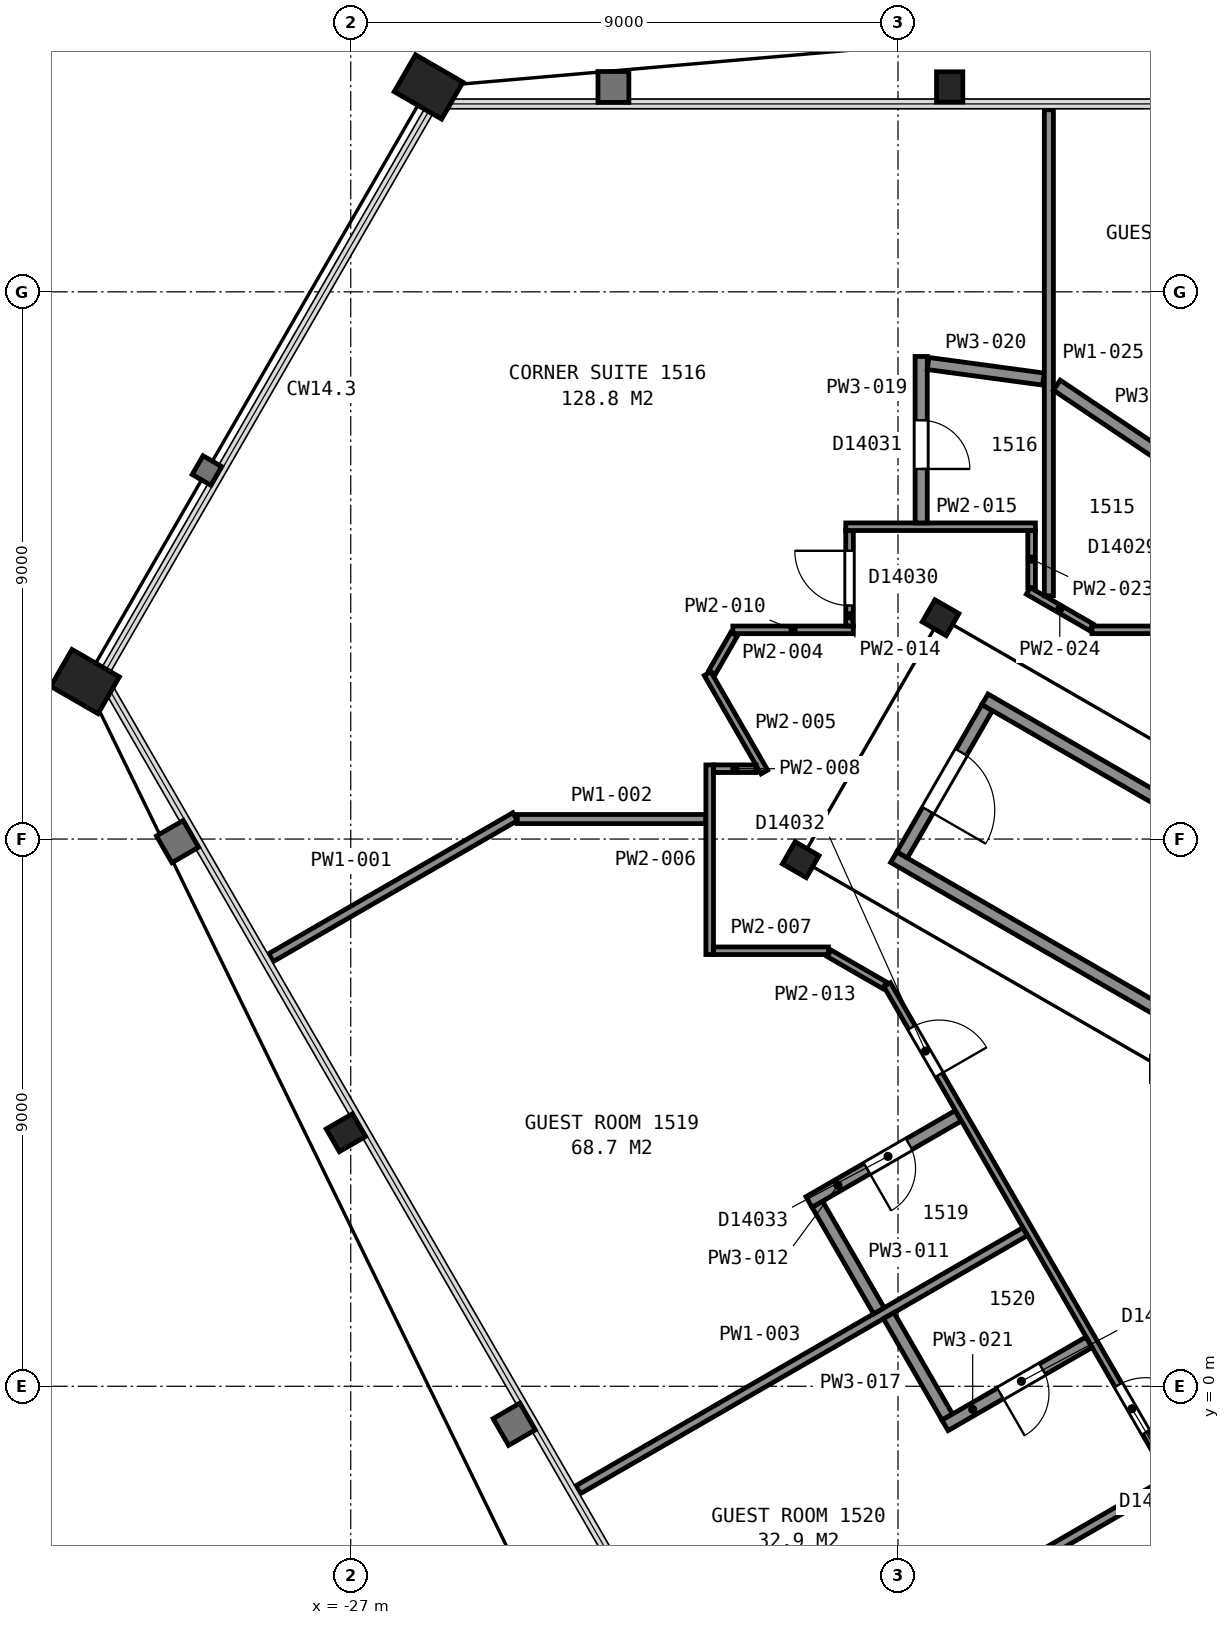
"""IFC4 building model, lengths in metres.
Left out: names, types, materials, properties, quantities, classifications, styles, units other than length and angle.
Written with IfcOpenShell. Run it as: python <this file> out.ifc"""

import sys

from ifc_helpers import new_model, si_unit, direction, frame, frame_2d, origin, origin_2d, place, context, subcontext, project, spatial, rectangle, hollow_rectangle, i_section, extrude, element, fill, save


model = new_model("IFC4")
c1 = context("Model", 3, precision=1e-05, world=origin(), true_north=direction((0.0, 1.0)))
c2 = subcontext(c1, "Body", "Model", "MODEL_VIEW")
j1 = project(units=[si_unit("LENGTHUNIT", "METRE"), si_unit("PLANEANGLEUNIT", "RADIAN")], contexts=[c1])
p1 = place(None, origin())
s1 = spatial("IfcSite", under=j1, at=p1, CompositionType="ELEMENT")
p2 = place(p1, origin())
s2 = spatial("IfcBuilding", under=s1, at=p2, CompositionType="ELEMENT")
p3 = place(p2, frame((0.0, 0.0, 69.2)))
s3 = spatial("IfcBuildingStorey", under=s2, at=p3, CompositionType="ELEMENT", Elevation=69.2)
p4 = place(p3, frame((-17.15, 21.37, 0.0), z_axis=(0.0, 0.0, 1.0), x_axis=(1.0, 0.0, 0.0)))
e1 = element("IfcColumn", 1, at=p4, inside=s3, PredefinedType="COLUMN", context=c2, shape_type="SweptSolid", body=[
    extrude(i_section(OverallWidth=0.432, OverallDepth=0.498, WebThickness=0.056, FlangeThickness=0.089, FilletRadius=0.015, at=origin_2d()), origin(), (0.0, 0.0, 1.0), 3.575),
])
for number, where, z_axis, x_axis in (
    (2, (-25.72, 21.37, 0.0), (0.0, 0.0, 1.0), (0.5, 0.866, 0.0)),
    (3, (-31.37, 11.59, 0.0), (0.0, 0.0, 1.0), (0.5, 0.866, 0.0)),
):
    element("IfcColumn", number, at=place(p3, frame(where, z_axis=z_axis, x_axis=x_axis)), inside=s3, PredefinedType="COLUMN", context=c2, shape_type="SweptSolid", body=[
        extrude(hollow_rectangle(XDim=0.7, YDim=0.9, WallThickness=0.065, at=origin_2d()), origin(), (0.0, 0.0, 1.0), 3.56),
    ])
p5 = place(p3, frame((-27.08, 4.17, 0.0), z_axis=(0.0, 0.0, 1.0), x_axis=(-0.5, 0.866025403784, 0.0)))
e4 = element("IfcColumn", 4, at=p5, inside=s3, PredefinedType="COLUMN", context=c2, shape_type="SweptSolid", body=[
    extrude(i_section(OverallWidth=0.432, OverallDepth=0.498, WebThickness=0.056, FlangeThickness=0.089, FilletRadius=0.015, at=origin_2d()), origin(), (0.0, 0.0, 1.0), 3.575),
])
for number, where, z_axis, x_axis in (
    (5, (-17.3, 12.64, 0.0), (0.0, 0.0, 1.0), (0.5, 0.866, 0.0)),
    (6, (-19.6, 8.66, 0.0), (0.0, 0.0, 1.0), (0.5, 0.866, 0.0)),
):
    element("IfcColumn", number, at=place(p3, frame(where, z_axis=z_axis, x_axis=x_axis)), inside=s3, PredefinedType="COLUMN", context=c2, shape_type="SweptSolid", body=[
        extrude(i_section(OverallWidth=0.419, OverallDepth=0.455, WebThickness=0.042, FlangeThickness=0.068, FilletRadius=0.015, at=origin_2d()), origin(), (0.0, 0.0, 1.0), 3.6),
    ])
p6 = place(p3, frame((-16.534, 11.162, 0.0), z_axis=(0.0, 0.0, 1.0), x_axis=(-0.49998411664, -0.866034573852, 0.0)))
e7 = element("IfcWall", 7, at=p6, inside=s3, PredefinedType="PARTITIONING", context=c2, shape_type="SweptSolid", body=[
    extrude(rectangle(XDim=2.8, YDim=0.2, at=frame_2d((1.4, 0.0))), origin(), (0.0, 0.0, 1.0), 3.35),
])
p7 = place(p6, frame((0.85, 0.0, 0.0)))
e8 = element("IfcOpeningElement", 8, at=p7, cuts=e7, PredefinedType="OPENING", context=c2, shape_type="SweptSolid", body=[
    extrude(rectangle(XDim=1.1, YDim=2.1, at=frame_2d((0.55, 1.05))), frame((0.0, 0.11, 0.0), z_axis=(0.0, -1.0, 0.0), x_axis=(1.0, 0.0, 0.0)), (0.0, 0.0, 1.0), 0.22),
])
for number, where, z_axis, x_axis in (
    (9, (-7.678, 2.701, 0.0), (0.0, 0.0, 1.0), (-0.866, 0.5, 0.0)),
    (10, (-6.178, 5.299, 0.0), (0.0, 0.0, 1.0), (-0.866, 0.5, 0.0)),
):
    element("IfcWall", number, at=place(p3, frame(where, z_axis=z_axis, x_axis=x_axis)), inside=s3, PredefinedType="PARTITIONING", context=c2, shape_type="SweptSolid", body=[
        extrude(rectangle(XDim=12.0, YDim=0.2, at=frame_2d((6.0, 0.0))), origin(), (0.0, 0.0, 1.0), 3.35),
    ])
p8 = place(p3, frame((-28.313, 7.05, 0.0), z_axis=(0.0, 0.0, 1.0), x_axis=(0.866076865069, 0.499910855846, 0.0)))
e11 = element("IfcWall", 11, at=p8, inside=s3, PredefinedType="PARTITIONING", context=c2, shape_type="SweptSolid", body=[
    extrude(rectangle(XDim=4.636, YDim=0.15, at=frame_2d((2.318, 0.0))), origin(), (0.0, 0.0, 1.0), 2.613),
])
p9 = place(p3, frame((-24.262, 9.329, 0.0), z_axis=(0.0, 0.0, 1.0), x_axis=(1.0, 0.0, 0.0)))
e12 = element("IfcWall", 12, at=p9, inside=s3, PredefinedType="PARTITIONING", context=c2, shape_type="SweptSolid", body=[
    extrude(rectangle(XDim=3.103, YDim=0.15, at=frame_2d((1.551, 0.0))), origin(), (0.0, 0.0, 1.0), 2.613),
])
p10 = place(p3, frame((-23.26, -1.701, 0.0), z_axis=(0.0, 0.0, 1.0), x_axis=(0.866027021296, 0.499997198377, 0.0)))
e13 = element("IfcWall", 13, at=p10, inside=s3, PredefinedType="PARTITIONING", context=c2, shape_type="SweptSolid", body=[
    extrude(rectangle(XDim=8.487, YDim=0.15, at=frame_2d((4.243, 0.0))), origin(), (0.0, 0.0, 1.0), 2.613),
])
p11 = place(p3, frame((-21.059, 11.741, 0.0), z_axis=(0.0, 0.0, 1.0), x_axis=(0.500238258503, 0.865887801468, 0.0)))
e14 = element("IfcWall", 14, at=p11, inside=s3, PredefinedType="PARTITIONING", context=c2, shape_type="SweptSolid", body=[
    extrude(rectangle(XDim=0.724, YDim=0.125, at=frame_2d((0.362, 0.0))), origin(), (0.0, 0.0, 1.0), 2.613),
])
p12 = place(p3, frame((-21.132, 11.721, 0.0), z_axis=(0.0, 0.0, 1.0), x_axis=(0.500072997275, -0.865983254686, 0.0)))
e15 = element("IfcWall", 15, at=p12, inside=s3, PredefinedType="PARTITIONING", context=c2, shape_type="SweptSolid", body=[
    extrude(rectangle(XDim=1.869, YDim=0.125, at=frame_2d((0.935, 0.0))), origin(), (0.0, 0.0, 1.0), 2.613),
])
p13 = place(p3, frame((-21.097, 7.101, 0.0), z_axis=(0.0, 0.0, 1.0), x_axis=(0.0, 1.0, 0.0)))
e16 = element("IfcWall", 16, at=p13, inside=s3, PredefinedType="PARTITIONING", context=c2, shape_type="SweptSolid", body=[
    extrude(rectangle(XDim=3.119, YDim=0.125, at=frame_2d((1.56, 0.0))), origin(), (0.0, 0.0, 1.0), 2.613),
])
p14 = place(p3, frame((-21.032, 7.163, 0.0), z_axis=(0.0, 0.0, 1.0), x_axis=(1.0, 0.0, 0.0)))
e17 = element("IfcWall", 17, at=p14, inside=s3, PredefinedType="PARTITIONING", context=c2, shape_type="SweptSolid", body=[
    extrude(rectangle(XDim=1.888, YDim=0.125, at=frame_2d((0.944, 0.0))), origin(), (0.0, 0.0, 1.0), 2.613),
])
p15 = place(p3, frame((-21.032, 10.157, 0.0), z_axis=(0.0, 0.0, 1.0), x_axis=(1.0, 0.0, 0.0)))
e18 = element("IfcWall", 18, at=p15, inside=s3, PredefinedType="PARTITIONING", context=c2, shape_type="SweptSolid", body=[
    extrude(rectangle(XDim=0.698, YDim=0.125, at=frame_2d((0.349, 0.0))), origin(), (0.0, 0.0, 1.0), 2.613),
])
p16 = place(p3, frame((-20.889, -5.809, 0.0), z_axis=(0.0, 0.0, 1.0), x_axis=(0.866022790583, 0.50000452617, 0.0)))
e19 = element("IfcWall", 19, at=p16, inside=s3, PredefinedType="PARTITIONING", context=c2, shape_type="SweptSolid", body=[
    extrude(rectangle(XDim=8.491, YDim=0.15, at=frame_2d((4.246, 0.0))), origin(), (0.0, 0.0, 1.0), 2.613),
])
p17 = place(p3, frame((-20.717, 12.441, 0.0), z_axis=(0.0, 0.0, 1.0), x_axis=(1.0, 0.0, 0.0)))
e20 = element("IfcWall", 20, at=p17, inside=s3, PredefinedType="PARTITIONING", context=c2, shape_type="SweptSolid", body=[
    extrude(rectangle(XDim=1.982, YDim=0.125, at=frame_2d((0.991, 0.0))), origin(), (0.0, 0.0, 1.0), 2.613),
])
p18 = place(p3, frame((-19.327, 2.994, 0.0), z_axis=(0.0, 0.0, 1.0), x_axis=(0.500042536776, -0.866000843773, 0.0)))
e21 = element("IfcWall", 21, at=p18, inside=s3, PredefinedType="PARTITIONING", context=c2, shape_type="SweptSolid", body=[
    extrude(rectangle(XDim=2.025, YDim=0.2, at=frame_2d((1.012, 0.0))), origin(), (0.0, 0.0, 1.0), 2.613),
])
p19 = place(p3, frame((-17.01, 4.447, 0.0), z_axis=(0.0, 0.0, 1.0), x_axis=(-0.866033446572, -0.499986069224, 0.0)))
e22 = element("IfcWall", 22, at=p19, inside=s3, PredefinedType="PARTITIONING", context=c2, shape_type="SweptSolid", body=[
    extrude(rectangle(XDim=2.833, YDim=0.2, at=frame_2d((1.416, 0.0))), origin(), (0.0, 0.0, 1.0), 2.613),
])
p20 = place(p19, frame((0.933, 0.0, 0.0)))
e23 = element("IfcOpeningElement", 23, at=p20, cuts=e22, PredefinedType="OPENING", context=c2, shape_type="SweptSolid", body=[
    extrude(rectangle(XDim=0.8, YDim=2.1, at=frame_2d((0.4, 1.05))), frame((0.0, 0.11, 0.0), z_axis=(0.0, -1.0, 0.0), x_axis=(1.0, 0.0, 0.0)), (0.0, 0.0, 1.0), 0.22),
])
p21 = place(p3, frame((-19.132, 7.121, 0.0), z_axis=(0.0, 0.0, 1.0), x_axis=(0.865876245925, -0.500258260045, 0.0)))
e24 = element("IfcWall", 24, at=p21, inside=s3, PredefinedType="PARTITIONING", context=c2, shape_type="SweptSolid", body=[
    extrude(rectangle(XDim=1.052, YDim=0.125, at=frame_2d((0.526, 0.0))), origin(), (0.0, 0.0, 1.0), 2.613),
])
p22 = place(p3, frame((-18.797, 12.506, 0.0), z_axis=(0.0, 0.0, 1.0), x_axis=(0.0, 1.0, 0.0)))
e25 = element("IfcWall", 25, at=p22, inside=s3, PredefinedType="PARTITIONING", context=c2, shape_type="SweptSolid", body=[
    extrude(rectangle(XDim=1.566, YDim=0.125, at=frame_2d((0.783, 0.0))), origin(), (0.0, 0.0, 1.0), 2.613),
])
p23 = place(p22, frame((0.335, 0.0, 0.0)))
e26 = element("IfcOpeningElement", 26, at=p23, cuts=e25, PredefinedType="OPENING", context=c2, shape_type="SweptSolid", body=[
    extrude(rectangle(XDim=0.9, YDim=2.1, at=frame_2d((0.45, 1.05))), frame((0.0, 0.073, 0.0), z_axis=(0.0, -1.0, 0.0), x_axis=(1.0, 0.0, 0.0)), (0.0, 0.0, 1.0), 0.145),
])
p24 = place(p3, frame((-18.86, 14.137, 0.0), z_axis=(0.0, 0.0, 1.0), x_axis=(1.0, 0.0, 0.0)))
e27 = element("IfcWall", 27, at=p24, inside=s3, PredefinedType="PARTITIONING", context=c2, shape_type="SweptSolid", body=[
    extrude(rectangle(XDim=3.119, YDim=0.125, at=frame_2d((1.56, 0.0))), origin(), (0.0, 0.0, 1.0), 2.613),
])
p25 = place(p3, frame((-18.153, 1.161, 0.0), z_axis=(0.0, 0.0, 1.0), x_axis=(0.499971247393, -0.866042003473, 0.0)))
e28 = element("IfcWall", 28, at=p25, inside=s3, PredefinedType="PARTITIONING", context=c2, shape_type="SweptSolid", body=[
    extrude(rectangle(XDim=1.925, YDim=0.2, at=frame_2d((0.963, 0.0))), origin(), (0.0, 0.0, 1.0), 2.613),
])
p26 = place(p3, frame((-3.766, -18.358, 0.0), z_axis=(0.0, 0.0, 1.0), x_axis=(-0.500003973642, 0.866023109589, 0.0)))
e29 = element("IfcWall", 29, at=p26, inside=s3, PredefinedType="PARTITIONING", context=c2, shape_type="SweptSolid", body=[
    extrude(rectangle(XDim=28.826, YDim=0.125, at=frame_2d((14.413, 0.0))), origin(), (0.0, 0.0, 1.0), 2.613),
])
p27 = place(p26, frame((27.114, 0.0, 0.0)))
e30 = element("IfcOpeningElement", 30, at=p27, cuts=e29, PredefinedType="OPENING", context=c2, shape_type="SweptSolid", body=[
    extrude(rectangle(XDim=0.9, YDim=2.1, at=frame_2d((0.45, 1.05))), frame((0.0, 0.073, 0.0), z_axis=(0.0, -1.0, 0.0), x_axis=(1.0, 0.0, 0.0)), (0.0, 0.0, 1.0), 0.145),
])
p28 = place(p26, frame((20.322, 0.0, 0.0)))
e31 = element("IfcOpeningElement", 31, at=p28, cuts=e29, PredefinedType="OPENING", context=c2, shape_type="SweptSolid", body=[
    extrude(rectangle(XDim=0.9, YDim=2.1, at=frame_2d((0.45, 1.05))), frame((0.0, 0.073, 0.0), z_axis=(0.0, -1.0, 0.0), x_axis=(1.0, 0.0, 0.0)), (0.0, 0.0, 1.0), 0.145),
])
p29 = place(p26, frame((17.68, 0.0, 0.0)))
e32 = element("IfcOpeningElement", 32, at=p29, cuts=e29, PredefinedType="OPENING", context=c2, shape_type="SweptSolid", body=[
    extrude(rectangle(XDim=0.9, YDim=2.1, at=frame_2d((0.45, 1.05))), frame((0.0, 0.073, 0.0), z_axis=(0.0, -1.0, 0.0), x_axis=(1.0, 0.0, 0.0)), (0.0, 0.0, 1.0), 0.145),
])
p30 = place(p26, frame((10.836, 0.0, 0.0)))
e33 = element("IfcOpeningElement", 33, at=p30, cuts=e29, PredefinedType="OPENING", context=c2, shape_type="SweptSolid", body=[
    extrude(rectangle(XDim=0.9, YDim=2.1, at=frame_2d((0.45, 1.05))), frame((0.0, 0.073, 0.0), z_axis=(0.0, -1.0, 0.0), x_axis=(1.0, 0.0, 0.0)), (0.0, 0.0, 1.0), 0.145),
])
p31 = place(p26, frame((7.342, 0.0, 0.0)))
e34 = element("IfcOpeningElement", 34, at=p31, cuts=e29, PredefinedType="OPENING", context=c2, shape_type="SweptSolid", body=[
    extrude(rectangle(XDim=0.9, YDim=2.1, at=frame_2d((0.45, 1.05))), frame((0.0, 0.073, 0.0), z_axis=(0.0, -1.0, 0.0), x_axis=(1.0, 0.0, 0.0)), (0.0, 0.0, 1.0), 0.145),
])
p32 = place(p3, frame((-17.619, 16.937, 0.0), z_axis=(0.0, 0.0, 1.0), x_axis=(0.0, -1.0, 0.0)))
e35 = element("IfcWall", 35, at=p32, inside=s3, PredefinedType="PARTITIONING", context=c2, shape_type="SweptSolid", body=[
    extrude(rectangle(XDim=2.738, YDim=0.2, at=frame_2d((1.369, 0.0))), origin(), (0.0, 0.0, 1.0), 2.613),
])
p33 = place(p32, frame((1.05, 0.0, 0.0)))
e36 = element("IfcOpeningElement", 36, at=p33, cuts=e35, PredefinedType="OPENING", context=c2, shape_type="SweptSolid", body=[
    extrude(rectangle(XDim=0.8, YDim=2.1, at=frame_2d((0.4, 1.05))), frame((0.0, 0.11, 0.0), z_axis=(0.0, -1.0, 0.0), x_axis=(1.0, 0.0, 0.0)), (0.0, 0.0, 1.0), 0.22),
])
p34 = place(p3, frame((-17.505, 16.822, 0.0), z_axis=(0.0, 0.0, 1.0), x_axis=(0.990982367401, -0.133992341199, 0.0)))
e37 = element("IfcWall", 37, at=p34, inside=s3, PredefinedType="PARTITIONING", context=c2, shape_type="SweptSolid", body=[
    extrude(rectangle(XDim=1.915, YDim=0.2, at=frame_2d((0.958, 0.0))), origin(), (0.0, 0.0, 1.0), 2.613),
])
p35 = place(p3, frame((-17.227, -0.643, 0.0), z_axis=(0.0, 0.0, 1.0), x_axis=(0.866012976267, 0.500021524473, 0.0)))
e38 = element("IfcWall", 38, at=p35, inside=s3, PredefinedType="PARTITIONING", context=c2, shape_type="SweptSolid", body=[
    extrude(rectangle(XDim=2.732, YDim=0.2, at=frame_2d((1.366, 0.0))), origin(), (0.0, 0.0, 1.0), 2.613),
])
p36 = place(p35, frame((1.05, 0.0, 0.0)))
e39 = element("IfcOpeningElement", 39, at=p36, cuts=e38, PredefinedType="OPENING", context=c2, shape_type="SweptSolid", body=[
    extrude(rectangle(XDim=0.8, YDim=2.1, at=frame_2d((0.4, 1.05))), frame((0.0, 0.11, 0.0), z_axis=(0.0, -1.0, 0.0), x_axis=(1.0, 0.0, 0.0)), (0.0, 0.0, 1.0), 0.22),
])
p37 = place(p3, frame((-15.803, 13.135, 0.0), z_axis=(0.0, 0.0, 1.0), x_axis=(0.0, 1.0, 0.0)))
e40 = element("IfcWall", 40, at=p37, inside=s3, PredefinedType="PARTITIONING", context=c2, shape_type="SweptSolid", body=[
    extrude(rectangle(XDim=0.937, YDim=0.125, at=frame_2d((0.469, 0.0))), origin(), (0.0, 0.0, 1.0), 2.613),
])
p38 = place(p3, frame((-15.857, 13.081, 0.0), z_axis=(0.0, 0.0, 1.0), x_axis=(0.866035997947, -0.499981649923, 0.0)))
e41 = element("IfcWall", 41, at=p38, inside=s3, PredefinedType="PARTITIONING", context=c2, shape_type="SweptSolid", body=[
    extrude(rectangle(XDim=1.196, YDim=0.125, at=frame_2d((0.598, 0.0))), origin(), (0.0, 0.0, 1.0), 2.613),
])
p39 = place(p3, frame((-15.519, 13.001, 0.0), z_axis=(0.0, 0.0, 1.0), x_axis=(0.0, 1.0, 0.0)))
e42 = element("IfcWall", 42, at=p39, inside=s3, PredefinedType="PARTITIONING", context=c2, shape_type="SweptSolid", body=[
    extrude(rectangle(XDim=7.994, YDim=0.15, at=frame_2d((3.997, 0.0))), origin(), (0.0, 0.0, 1.0), 2.613),
])
p40 = place(p3, frame((-15.388, 16.465, 0.0), z_axis=(0.0, 0.0, 1.0), x_axis=(0.82987399284, -0.557950854474, 0.0)))
e43 = element("IfcWall", 43, at=p40, inside=s3, PredefinedType="PARTITIONING", context=c2, shape_type="SweptSolid", body=[
    extrude(rectangle(XDim=2.233, YDim=0.2, at=frame_2d((1.116, 0.0))), origin(), (0.0, 0.0, 1.0), 2.613),
])
p41 = place(p3, frame((-14.811, 12.441, 0.0), z_axis=(0.0, 0.0, 1.0), x_axis=(1.0, 0.0, 0.0)))
e44 = element("IfcWall", 44, at=p41, inside=s3, PredefinedType="PARTITIONING", context=c2, shape_type="SweptSolid", body=[
    extrude(rectangle(XDim=29.621, YDim=0.125, at=frame_2d((14.811, 0.0))), origin(), (0.0, 0.0, 1.0), 2.613),
])
p42 = place(p41, frame((25.326, 0.0, 0.0)))
e45 = element("IfcOpeningElement", 45, at=p42, cuts=e44, PredefinedType="OPENING", context=c2, shape_type="SweptSolid", body=[
    extrude(rectangle(XDim=0.9, YDim=2.1, at=frame_2d((0.45, 1.05))), frame((0.0, 0.073, 0.0), z_axis=(0.0, -1.0, 0.0), x_axis=(1.0, 0.0, 0.0)), (0.0, 0.0, 1.0), 0.145),
])
p43 = place(p41, frame((21.833, 0.0, 0.0)))
e46 = element("IfcOpeningElement", 46, at=p43, cuts=e44, PredefinedType="OPENING", context=c2, shape_type="SweptSolid", body=[
    extrude(rectangle(XDim=0.9, YDim=2.1, at=frame_2d((0.45, 1.05))), frame((0.0, 0.073, 0.0), z_axis=(0.0, -1.0, 0.0), x_axis=(1.0, 0.0, 0.0)), (0.0, 0.0, 1.0), 0.145),
])
p44 = place(p41, frame((14.99, 0.0, 0.0)))
e47 = element("IfcOpeningElement", 47, at=p44, cuts=e44, PredefinedType="OPENING", context=c2, shape_type="SweptSolid", body=[
    extrude(rectangle(XDim=0.9, YDim=2.1, at=frame_2d((0.45, 1.05))), frame((0.0, 0.073, 0.0), z_axis=(0.0, -1.0, 0.0), x_axis=(1.0, 0.0, 0.0)), (0.0, 0.0, 1.0), 0.145),
])
p45 = place(p41, frame((12.128, 0.0, 0.0)))
e48 = element("IfcOpeningElement", 48, at=p45, cuts=e44, PredefinedType="OPENING", context=c2, shape_type="SweptSolid", body=[
    extrude(rectangle(XDim=0.9, YDim=2.1, at=frame_2d((0.45, 1.05))), frame((0.0, 0.073, 0.0), z_axis=(0.0, -1.0, 0.0), x_axis=(1.0, 0.0, 0.0)), (0.0, 0.0, 1.0), 0.145),
])
p46 = place(p41, frame((4.885, 0.0, 0.0)))
e49 = element("IfcOpeningElement", 49, at=p46, cuts=e44, PredefinedType="OPENING", context=c2, shape_type="SweptSolid", body=[
    extrude(rectangle(XDim=0.9, YDim=2.1, at=frame_2d((0.45, 1.05))), frame((0.0, 0.073, 0.0), z_axis=(0.0, -1.0, 0.0), x_axis=(1.0, 0.0, 0.0)), (0.0, 0.0, 1.0), 0.145),
])
p47 = place(p41, frame((2.241, 0.0, 0.0)))
e50 = element("IfcOpeningElement", 50, at=p47, cuts=e44, PredefinedType="OPENING", context=c2, shape_type="SweptSolid", body=[
    extrude(rectangle(XDim=0.9, YDim=2.1, at=frame_2d((0.45, 1.05))), frame((0.0, 0.073, 0.0), z_axis=(0.0, -1.0, 0.0), x_axis=(1.0, 0.0, 0.0)), (0.0, 0.0, 1.0), 0.145),
])
p48 = place(p7, origin())
e51 = element("IfcDoor", 51, at=p48, inside=s3, OperationType="SINGLE_SWING_RIGHT", PredefinedType="DOOR", context=c2, shape_type="SweptSolid", body=[
    extrude(rectangle(XDim=1.1, YDim=2.1, at=frame_2d((0.55, 1.05))), frame((0.0, 0.025, 0.0), z_axis=(0.0, -1.0, 0.0), x_axis=(1.0, 0.0, 0.0)), (0.0, 0.0, 1.0), 0.05),
])
fill(e8, e51)
p49 = place(p20, origin())
e52 = element("IfcDoor", 52, at=p49, inside=s3, OperationType="SINGLE_SWING_RIGHT", PredefinedType="DOOR", context=c2, shape_type="SweptSolid", body=[
    extrude(rectangle(XDim=0.8, YDim=2.1, at=frame_2d((0.4, 1.05))), frame((0.0, 0.025, 0.0), z_axis=(0.0, -1.0, 0.0), x_axis=(1.0, 0.0, 0.0)), (0.0, 0.0, 1.0), 0.05),
])
fill(e23, e52)
p50 = place(p23, origin())
e53 = element("IfcDoor", 53, at=p50, inside=s3, OperationType="SINGLE_SWING_RIGHT", PredefinedType="DOOR", context=c2, shape_type="SweptSolid", body=[
    extrude(rectangle(XDim=0.9, YDim=2.1, at=frame_2d((0.45, 1.05))), frame((0.0, 0.025, 0.0), z_axis=(0.0, -1.0, 0.0), x_axis=(1.0, 0.0, 0.0)), (0.0, 0.0, 1.0), 0.05),
])
fill(e26, e53)
p51 = place(p27, origin())
e54 = element("IfcDoor", 54, at=p51, inside=s3, OperationType="SINGLE_SWING_LEFT", PredefinedType="DOOR", context=c2, shape_type="SweptSolid", body=[
    extrude(rectangle(XDim=0.9, YDim=2.1, at=frame_2d((0.45, 1.05))), frame((0.0, 0.025, 0.0), z_axis=(0.0, -1.0, 0.0), x_axis=(1.0, 0.0, 0.0)), (0.0, 0.0, 1.0), 0.05),
])
fill(e30, e54)
p52 = place(p28, origin())
e55 = element("IfcDoor", 55, at=p52, inside=s3, OperationType="SINGLE_SWING_LEFT", PredefinedType="DOOR", context=c2, shape_type="SweptSolid", body=[
    extrude(rectangle(XDim=0.9, YDim=2.1, at=frame_2d((0.45, 1.05))), frame((0.0, 0.025, 0.0), z_axis=(0.0, -1.0, 0.0), x_axis=(1.0, 0.0, 0.0)), (0.0, 0.0, 1.0), 0.05),
])
fill(e31, e55)
p53 = place(p33, origin())
e56 = element("IfcDoor", 56, at=p53, inside=s3, OperationType="SINGLE_SWING_RIGHT", PredefinedType="DOOR", context=c2, shape_type="SweptSolid", body=[
    extrude(rectangle(XDim=0.8, YDim=2.1, at=frame_2d((0.4, 1.05))), frame((0.0, 0.025, 0.0), z_axis=(0.0, -1.0, 0.0), x_axis=(1.0, 0.0, 0.0)), (0.0, 0.0, 1.0), 0.05),
])
fill(e36, e56)
p54 = place(p36, origin())
e57 = element("IfcDoor", 57, at=p54, inside=s3, OperationType="SINGLE_SWING_LEFT", PredefinedType="DOOR", context=c2, shape_type="SweptSolid", body=[
    extrude(rectangle(XDim=0.8, YDim=2.1, at=frame_2d((0.4, 1.05))), frame((0.0, 0.025, 0.0), z_axis=(0.0, -1.0, 0.0), x_axis=(1.0, 0.0, 0.0)), (0.0, 0.0, 1.0), 0.05),
])
fill(e39, e57)
save(model, sys.argv[1])
